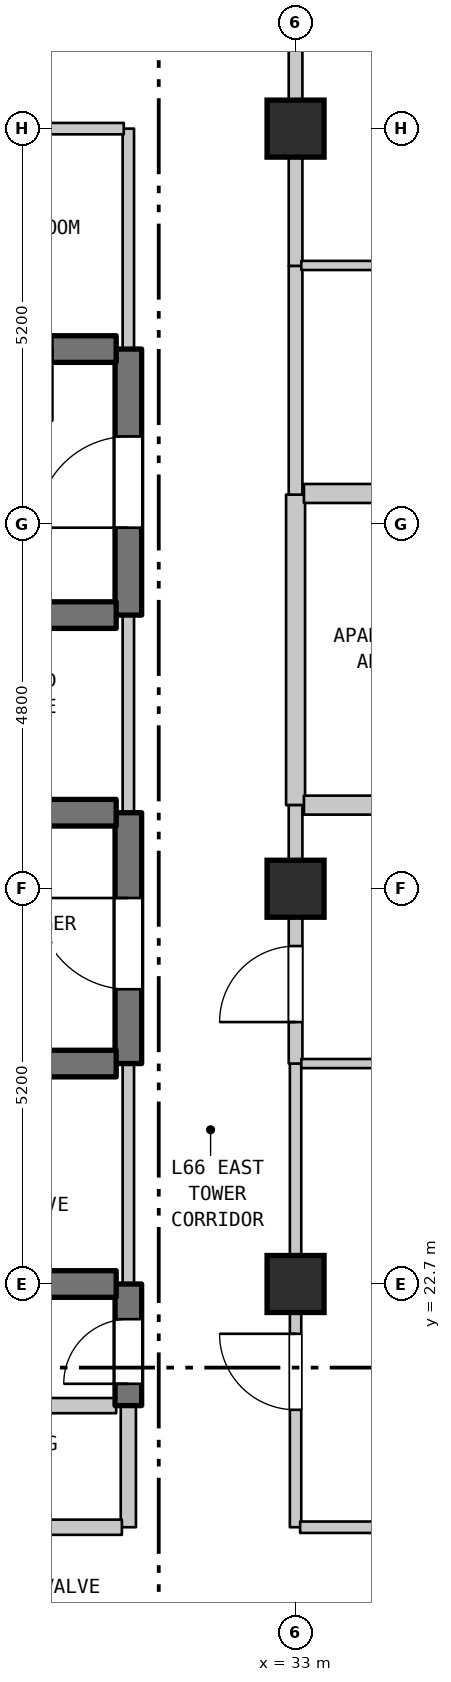
"""IFC4 building model, lengths in metres.
Left out: names, types, materials, properties, quantities, classifications, styles, units other than length and angle.
Written with IfcOpenShell. Run it as: python <this file> out.ifc"""

import sys

from ifc_helpers import new_model, si_unit, direction, frame, frame_2d, origin, origin_2d, place, context, subcontext, project, spatial, rectangle, extrude, element, fill, save


model = new_model("IFC4")
c1 = context("Model", 3, precision=1e-05, world=origin(), true_north=direction((0.0, 1.0)))
c2 = subcontext(c1, "Body", "Model", "MODEL_VIEW")
j1 = project(units=[si_unit("LENGTHUNIT", "METRE"), si_unit("PLANEANGLEUNIT", "RADIAN")], contexts=[c1])
p1 = place(None, origin())
s1 = spatial("IfcSite", under=j1, at=p1, CompositionType="ELEMENT")
p2 = place(p1, origin())
s2 = spatial("IfcBuilding", under=s1, at=p2, CompositionType="ELEMENT")
p3 = place(p2, frame((0.0, 0.0, 265.8)))
s3 = spatial("IfcBuildingStorey", under=s2, at=p3, CompositionType="ELEMENT", Elevation=265.8)
for number, where, z_axis, x_axis in (
    (1, (33.0, 22.7, 0.0), (0.0, 0.0, 1.0), (1.0, 0.0, 0.0)),
    (2, (33.0, 27.9, 0.0), (0.0, 0.0, 1.0), (1.0, 0.0, 0.0)),
    (3, (33.0, 37.9, 0.0), (0.0, 0.0, 1.0), (1.0, 0.0, 0.0)),
):
    element("IfcColumn", number, at=place(p3, frame(where, z_axis=z_axis, x_axis=x_axis)), inside=s3, PredefinedType="COLUMN", context=c2, shape_type="SweptSolid", body=[
        extrude(rectangle(XDim=0.75, YDim=0.75, at=origin_2d()), origin(), (0.0, 0.0, 1.0), 3.7),
    ])
p4 = place(p3, frame((30.8, 19.5, 0.0), z_axis=(0.0, 0.0, 1.0), x_axis=(0.0, 1.0, 0.0)))
e4 = element("IfcWall", 4, at=p4, inside=s3, PredefinedType="STANDARD", context=c2, shape_type="SweptSolid", body=[
    extrude(rectangle(XDim=1.6, YDim=0.2, at=frame_2d((0.8, 0.0))), origin(), (0.0, 0.0, 1.0), 3.39),
])
p5 = place(p3, frame((30.8, 21.1, 0.0), z_axis=(0.0, 0.0, 1.0), x_axis=(0.0, 1.0, 0.0)))
e5 = element("IfcWall", 5, at=p5, inside=s3, PredefinedType="SHEAR", context=c2, shape_type="SweptSolid", body=[
    extrude(rectangle(XDim=1.6, YDim=0.35, at=frame_2d((0.8, 0.0))), origin(), (0.0, 0.0, 1.0), 3.39),
])
p6 = place(p5, frame((0.287, 0.0, 0.0)))
e6 = element("IfcOpeningElement", 6, at=p6, cuts=e5, PredefinedType="OPENING", context=c2, shape_type="SweptSolid", body=[
    extrude(rectangle(XDim=0.85, YDim=2.1, at=frame_2d((0.425, 1.05))), frame((0.0, 0.185, 0.0), z_axis=(0.0, -1.0, 0.0), x_axis=(1.0, 0.0, 0.0)), (0.0, 0.0, 1.0), 0.37),
])
p7 = place(p3, frame((30.8, 22.7, 0.0), z_axis=(0.0, 0.0, 1.0), x_axis=(0.0, 1.0, 0.0)))
e7 = element("IfcWall", 7, at=p7, inside=s3, PredefinedType="STANDARD", context=c2, shape_type="SweptSolid", body=[
    extrude(rectangle(XDim=2.9, YDim=0.15, at=frame_2d((1.45, 0.0))), origin(), (0.0, 0.0, 1.0), 3.39),
])
p8 = place(p3, frame((30.8, 25.6, 0.0), z_axis=(0.0, 0.0, 1.0), x_axis=(0.0, 1.0, 0.0)))
e8 = element("IfcWall", 8, at=p8, inside=s3, PredefinedType="SHEAR", context=c2, shape_type="SweptSolid", body=[
    extrude(rectangle(XDim=3.3, YDim=0.35, at=frame_2d((1.65, 0.0))), origin(), (0.0, 0.0, 1.0), 3.39),
])
p9 = place(p8, frame((0.978, 0.0, 0.0)))
e9 = element("IfcOpeningElement", 9, at=p9, cuts=e8, PredefinedType="OPENING", context=c2, shape_type="SweptSolid", body=[
    extrude(rectangle(XDim=1.2, YDim=2.2, at=frame_2d((0.6, 1.1))), frame((0.0, 0.185, 0.0), z_axis=(0.0, -1.0, 0.0), x_axis=(1.0, 0.0, 0.0)), (0.0, 0.0, 1.0), 0.37),
])
p10 = place(p3, frame((30.8, 28.9, 0.0), z_axis=(0.0, 0.0, 1.0), x_axis=(0.0, 1.0, 0.0)))
e10 = element("IfcWall", 10, at=p10, inside=s3, PredefinedType="STANDARD", context=c2, shape_type="SweptSolid", body=[
    extrude(rectangle(XDim=2.6, YDim=0.15, at=frame_2d((1.3, 0.0))), origin(), (0.0, 0.0, 1.0), 3.39),
])
p11 = place(p3, frame((30.8, 31.5, 0.0), z_axis=(0.0, 0.0, 1.0), x_axis=(0.0, 1.0, 0.0)))
e11 = element("IfcWall", 11, at=p11, inside=s3, PredefinedType="SHEAR", context=c2, shape_type="SweptSolid", body=[
    extrude(rectangle(XDim=3.5, YDim=0.35, at=frame_2d((1.75, 0.0))), origin(), (0.0, 0.0, 1.0), 3.39),
])
p12 = place(p11, frame((1.15, 0.0, 0.0)))
e12 = element("IfcOpeningElement", 12, at=p12, cuts=e11, PredefinedType="OPENING", context=c2, shape_type="SweptSolid", body=[
    extrude(rectangle(XDim=1.2, YDim=2.2, at=frame_2d((0.6, 1.1))), frame((0.0, 0.185, 0.0), z_axis=(0.0, -1.0, 0.0), x_axis=(1.0, 0.0, 0.0)), (0.0, 0.0, 1.0), 0.37),
])
p13 = place(p3, frame((30.8, 35.0, 0.0), z_axis=(0.0, 0.0, 1.0), x_axis=(0.0, 1.0, 0.0)))
e13 = element("IfcWall", 13, at=p13, inside=s3, PredefinedType="STANDARD", context=c2, shape_type="SweptSolid", body=[
    extrude(rectangle(XDim=2.9, YDim=0.15, at=frame_2d((1.45, 0.0))), origin(), (0.0, 0.0, 1.0), 3.39),
])
p14 = place(p3, frame((33.0, 19.5, 0.0), z_axis=(0.0, 0.0, 1.0), x_axis=(0.0, 1.0, 0.0)))
e14 = element("IfcWall", 14, at=p14, inside=s3, PredefinedType="STANDARD", context=c2, shape_type="SweptSolid", body=[
    extrude(rectangle(XDim=6.1, YDim=0.15, at=frame_2d((3.05, 0.0))), origin(), (0.0, 0.0, 1.0), 3.1),
])
p15 = place(p14, frame((1.545, 0.0, 0.0)))
e15 = element("IfcOpeningElement", 15, at=p15, cuts=e14, PredefinedType="OPENING", context=c2, shape_type="SweptSolid", body=[
    extrude(rectangle(XDim=1.0, YDim=2.15, at=frame_2d((0.5, 1.075))), frame((0.0, 0.085, 0.0), z_axis=(0.0, -1.0, 0.0), x_axis=(1.0, 0.0, 0.0)), (0.0, 0.0, 1.0), 0.17),
])
p16 = place(p3, frame((33.0, 25.6, 0.0), z_axis=(0.0, 0.0, 1.0), x_axis=(0.0, 1.0, 0.0)))
e16 = element("IfcWall", 16, at=p16, inside=s3, PredefinedType="STANDARD", context=c2, shape_type="SweptSolid", body=[
    extrude(rectangle(XDim=2.3, YDim=0.18, at=frame_2d((1.15, 0.0))), origin(), (0.0, 0.0, 1.0), 3.1),
])
p17 = place(p16, frame((0.546, 0.0, 0.0)))
e17 = element("IfcOpeningElement", 17, at=p17, cuts=e16, PredefinedType="OPENING", context=c2, shape_type="SweptSolid", body=[
    extrude(rectangle(XDim=1.0, YDim=2.15, at=frame_2d((0.5, 1.075))), frame((0.0, 0.1, 0.0), z_axis=(0.0, -1.0, 0.0), x_axis=(1.0, 0.0, 0.0)), (0.0, 0.0, 1.0), 0.2),
])
p18 = place(p3, frame((33.0, 29.0, 0.0), z_axis=(0.0, 0.0, 1.0), x_axis=(0.0, 1.0, 0.0)))
e18 = element("IfcWall", 18, at=p18, inside=s3, PredefinedType="STANDARD", context=c2, shape_type="SweptSolid", body=[
    extrude(rectangle(XDim=4.085, YDim=0.25, at=frame_2d((2.042, 0.0))), origin(), (0.0, 0.0, 1.0), 2.89),
])
p19 = place(p3, frame((33.0, 33.085, 0.0), z_axis=(0.0, 0.0, 1.0), x_axis=(0.0, 1.0, 0.0)))
e19 = element("IfcWall", 19, at=p19, inside=s3, PredefinedType="STANDARD", context=c2, shape_type="SweptSolid", body=[
    extrude(rectangle(XDim=3.01, YDim=0.18, at=frame_2d((1.505, 0.0))), origin(), (0.0, 0.0, 1.0), 2.89),
])
p20 = place(p3, frame((33.0, 36.095, 0.0), z_axis=(0.0, 0.0, 1.0), x_axis=(0.0, 1.0, 0.0)))
e20 = element("IfcWall", 20, at=p20, inside=s3, PredefinedType="STANDARD", context=c2, shape_type="SweptSolid", body=[
    extrude(rectangle(XDim=1.805, YDim=0.18, at=frame_2d((0.902, 0.0))), origin(), (0.0, 0.0, 1.0), 2.89),
])
p21 = place(p3, frame((27.285, 19.5, 0.0), z_axis=(0.0, 0.0, 1.0), x_axis=(1.0, 0.0, 0.0)))
e21 = element("IfcWall", 21, at=p21, inside=s3, PredefinedType="STANDARD", context=c2, shape_type="SweptSolid", body=[
    extrude(rectangle(XDim=3.43, YDim=0.2, at=frame_2d((1.715, 0.0))), origin(), (0.0, 0.0, 1.0), 3.39),
])
p22 = place(p21, frame((1.192, 0.0, 0.0)))
e22 = element("IfcOpeningElement", 22, at=p22, cuts=e21, PredefinedType="OPENING", context=c2, shape_type="SweptSolid", body=[
    extrude(rectangle(XDim=0.9, YDim=2.15, at=frame_2d((0.45, 1.075))), frame((0.0, 0.11, 0.0), z_axis=(0.0, -1.0, 0.0), x_axis=(1.0, 0.0, 0.0)), (0.0, 0.0, 1.0), 0.22),
])
p23 = place(p3, frame((33.06, 19.5, 0.0), z_axis=(0.0, 0.0, 1.0), x_axis=(1.0, 0.0, 0.0)))
e23 = element("IfcWall", 23, at=p23, inside=s3, PredefinedType="STANDARD", context=c2, shape_type="SweptSolid", body=[
    extrude(rectangle(XDim=8.323, YDim=0.15, at=frame_2d((4.162, 0.0))), origin(), (0.0, 0.0, 1.0), 3.39),
])
p24 = place(p23, frame((3.583, 0.0, 0.0)))
e24 = element("IfcOpeningElement", 24, at=p24, cuts=e23, PredefinedType="OPENING", context=c2, shape_type="SweptSolid", body=[
    extrude(rectangle(XDim=1.0, YDim=2.15, at=frame_2d((0.5, 1.075))), frame((0.0, 0.085, 0.0), z_axis=(0.0, -1.0, 0.0), x_axis=(1.0, 0.0, 0.0)), (0.0, 0.0, 1.0), 0.17),
])
p25 = place(p3, frame((27.285, 21.1, 0.0), z_axis=(0.0, 0.0, 1.0), x_axis=(1.0, 0.0, 0.0)))
e25 = element("IfcWall", 25, at=p25, inside=s3, PredefinedType="STANDARD", context=c2, shape_type="SweptSolid", body=[
    extrude(rectangle(XDim=3.355, YDim=0.2, at=frame_2d((1.677, 0.0))), origin(), (0.0, 0.0, 1.0), 3.39),
])
p26 = place(p3, frame((27.46, 22.7, 0.0), z_axis=(0.0, 0.0, 1.0), x_axis=(1.0, 0.0, 0.0)))
e26 = element("IfcWall", 26, at=p26, inside=s3, PredefinedType="SHEAR", context=c2, shape_type="SweptSolid", body=[
    extrude(rectangle(XDim=3.18, YDim=0.35, at=frame_2d((1.59, 0.0))), origin(), (0.0, 0.0, 1.0), 3.39),
])
p27 = place(p3, frame((27.46, 25.6, 0.0), z_axis=(0.0, 0.0, 1.0), x_axis=(1.0, 0.0, 0.0)))
e27 = element("IfcWall", 27, at=p27, inside=s3, PredefinedType="SHEAR", context=c2, shape_type="SweptSolid", body=[
    extrude(rectangle(XDim=3.18, YDim=0.35, at=frame_2d((1.59, 0.0))), origin(), (0.0, 0.0, 1.0), 3.39),
])
p28 = place(p27, frame((1.115, 0.0, 0.0)))
e28 = element("IfcOpeningElement", 28, at=p28, cuts=e27, PredefinedType="OPENING", context=c2, shape_type="SweptSolid", body=[
    extrude(rectangle(XDim=0.95, YDim=2.15, at=frame_2d((0.475, 1.075))), frame((0.0, 0.185, 0.0), z_axis=(0.0, -1.0, 0.0), x_axis=(1.0, 0.0, 0.0)), (0.0, 0.0, 1.0), 0.37),
])
p29 = place(p3, frame((33.075, 25.6, 0.0), z_axis=(0.0, 0.0, 1.0), x_axis=(1.0, 0.0, 0.0)))
e29 = element("IfcWall", 29, at=p29, inside=s3, PredefinedType="PARTITIONING", context=c2, shape_type="SweptSolid", body=[
    extrude(rectangle(XDim=11.59, YDim=0.12, at=frame_2d((5.795, 0.0))), origin(), (0.0, 0.0, 1.0), 3.39),
])
p30 = place(p3, frame((27.46, 28.9, 0.0), z_axis=(0.0, 0.0, 1.0), x_axis=(1.0, 0.0, 0.0)))
e30 = element("IfcWall", 30, at=p30, inside=s3, PredefinedType="SHEAR", context=c2, shape_type="SweptSolid", body=[
    extrude(rectangle(XDim=3.18, YDim=0.35, at=frame_2d((1.59, 0.0))), origin(), (0.0, 0.0, 1.0), 3.39),
])
p31 = place(p30, frame((1.115, 0.0, 0.0)))
e31 = element("IfcOpeningElement", 31, at=p31, cuts=e30, PredefinedType="OPENING", context=c2, shape_type="SweptSolid", body=[
    extrude(rectangle(XDim=0.95, YDim=2.15, at=frame_2d((0.475, 1.075))), frame((0.0, 0.185, 0.0), z_axis=(0.0, -1.0, 0.0), x_axis=(1.0, 0.0, 0.0)), (0.0, 0.0, 1.0), 0.37),
])
p32 = place(p3, frame((33.11, 29.0, 0.0), z_axis=(0.0, 0.0, 1.0), x_axis=(1.0, 0.0, 0.0)))
e32 = element("IfcWall", 32, at=p32, inside=s3, PredefinedType="STANDARD", context=c2, shape_type="SweptSolid", body=[
    extrude(rectangle(XDim=4.36, YDim=0.25, at=frame_2d((2.18, 0.0))), origin(), (0.0, 0.0, 1.0), 3.39),
])
p33 = place(p3, frame((27.46, 31.5, 0.0), z_axis=(0.0, 0.0, 1.0), x_axis=(1.0, 0.0, 0.0)))
e33 = element("IfcWall", 33, at=p33, inside=s3, PredefinedType="SHEAR", context=c2, shape_type="SweptSolid", body=[
    extrude(rectangle(XDim=3.18, YDim=0.35, at=frame_2d((1.59, 0.0))), origin(), (0.0, 0.0, 1.0), 3.39),
])
p34 = place(p3, frame((33.11, 33.1, 0.0), z_axis=(0.0, 0.0, 1.0), x_axis=(1.0, 0.0, 0.0)))
e34 = element("IfcWall", 34, at=p34, inside=s3, PredefinedType="STANDARD", context=c2, shape_type="SweptSolid", body=[
    extrude(rectangle(XDim=4.36, YDim=0.25, at=frame_2d((2.18, 0.0))), origin(), (0.0, 0.0, 1.0), 3.39),
])
p35 = place(p3, frame((28.045, 35.0, 0.0), z_axis=(0.0, 0.0, 1.0), x_axis=(1.0, 0.0, 0.0)))
e35 = element("IfcWall", 35, at=p35, inside=s3, PredefinedType="SHEAR", context=c2, shape_type="SweptSolid", body=[
    extrude(rectangle(XDim=2.595, YDim=0.35, at=frame_2d((1.297, 0.0))), origin(), (0.0, 0.0, 1.0), 3.39),
])
p36 = place(p35, frame((0.806, 0.0, 0.0)))
e36 = element("IfcOpeningElement", 36, at=p36, cuts=e35, PredefinedType="OPENING", context=c2, shape_type="SweptSolid", body=[
    extrude(rectangle(XDim=0.95, YDim=2.15, at=frame_2d((0.475, 1.075))), frame((0.0, 0.185, 0.0), z_axis=(0.0, -1.0, 0.0), x_axis=(1.0, 0.0, 0.0)), (0.0, 0.0, 1.0), 0.37),
])
p37 = place(p3, frame((33.075, 36.1, 0.0), z_axis=(0.0, 0.0, 1.0), x_axis=(1.0, 0.0, 0.0)))
e37 = element("IfcWall", 37, at=p37, inside=s3, PredefinedType="PARTITIONING", context=c2, shape_type="SweptSolid", body=[
    extrude(rectangle(XDim=4.46, YDim=0.12, at=frame_2d((2.23, 0.0))), origin(), (0.0, 0.0, 1.0), 3.39),
])
p38 = place(p3, frame((28.045, 37.9, 0.0), z_axis=(0.0, 0.0, 1.0), x_axis=(1.0, 0.0, 0.0)))
e38 = element("IfcWall", 38, at=p38, inside=s3, PredefinedType="STANDARD", context=c2, shape_type="SweptSolid", body=[
    extrude(rectangle(XDim=2.695, YDim=0.15, at=frame_2d((1.348, 0.0))), origin(), (0.0, 0.0, 1.0), 2.89),
])
p39 = place(p3, frame((33.0, 27.9, 0.0), z_axis=(0.0, 0.0, 1.0), x_axis=(0.0, 1.0, 0.0)))
e39 = element("IfcWall", 39, at=p39, inside=s3, PredefinedType="STANDARD", context=c2, shape_type="SweptSolid", body=[
    extrude(rectangle(XDim=1.1, YDim=0.18, at=frame_2d((0.55, 0.0))), origin(), (0.0, 0.0, 1.0), 2.89),
])
p40 = place(p3, frame((33.0, 37.9, 0.0), z_axis=(0.0, 0.0, 1.0), x_axis=(0.0, 1.0, 0.0)))
e40 = element("IfcWall", 40, at=p40, inside=s3, PredefinedType="STANDARD", context=c2, shape_type="SweptSolid", body=[
    extrude(rectangle(XDim=1.85, YDim=0.18, at=frame_2d((0.925, 0.0))), origin(), (0.0, 0.0, 1.0), 2.79),
])
p41 = place(p6, origin())
e41 = element("IfcDoor", 41, at=p41, inside=s3, OperationType="SINGLE_SWING_LEFT", PredefinedType="DOOR", context=c2, shape_type="SweptSolid", body=[
    extrude(rectangle(XDim=0.85, YDim=2.1, at=frame_2d((0.425, 1.05))), frame((0.0, 0.025, 0.0), z_axis=(0.0, -1.0, 0.0), x_axis=(1.0, 0.0, 0.0)), (0.0, 0.0, 1.0), 0.05),
])
fill(e6, e41)
p42 = place(p9, origin())
e42 = element("IfcDoor", 42, at=p42, inside=s3, OperationType="SINGLE_SWING_RIGHT", PredefinedType="DOOR", context=c2, shape_type="SweptSolid", body=[
    extrude(rectangle(XDim=1.2, YDim=2.2, at=frame_2d((0.6, 1.1))), frame((0.0, 0.025, 0.0), z_axis=(0.0, -1.0, 0.0), x_axis=(1.0, 0.0, 0.0)), (0.0, 0.0, 1.0), 0.05),
])
fill(e9, e42)
p43 = place(p12, origin())
e43 = element("IfcDoor", 43, at=p43, inside=s3, OperationType="SINGLE_SWING_LEFT", PredefinedType="DOOR", context=c2, shape_type="SweptSolid", body=[
    extrude(rectangle(XDim=1.2, YDim=2.2, at=frame_2d((0.6, 1.1))), frame((0.0, 0.025, 0.0), z_axis=(0.0, -1.0, 0.0), x_axis=(1.0, 0.0, 0.0)), (0.0, 0.0, 1.0), 0.05),
])
fill(e12, e43)
p44 = place(p15, origin())
e44 = element("IfcDoor", 44, at=p44, inside=s3, OperationType="SINGLE_SWING_RIGHT", PredefinedType="DOOR", context=c2, shape_type="SweptSolid", body=[
    extrude(rectangle(XDim=1.0, YDim=2.15, at=frame_2d((0.5, 1.075))), frame((0.0, 0.025, 0.0), z_axis=(0.0, -1.0, 0.0), x_axis=(1.0, 0.0, 0.0)), (0.0, 0.0, 1.0), 0.05),
])
fill(e15, e44)
p45 = place(p17, origin())
e45 = element("IfcDoor", 45, at=p45, inside=s3, OperationType="SINGLE_SWING_LEFT", PredefinedType="DOOR", context=c2, shape_type="SweptSolid", body=[
    extrude(rectangle(XDim=1.0, YDim=2.15, at=frame_2d((0.5, 1.075))), frame((0.0, 0.025, 0.0), z_axis=(0.0, -1.0, 0.0), x_axis=(1.0, 0.0, 0.0)), (0.0, 0.0, 1.0), 0.05),
])
fill(e17, e45)
p46 = place(p36, frame((0.95, 0.0, 0.0), z_axis=(0.0, 0.0, 1.0), x_axis=(-1.0, 0.0, 0.0)))
e46 = element("IfcDoor", 46, at=p46, inside=s3, OperationType="SINGLE_SWING_RIGHT", PredefinedType="DOOR", context=c2, shape_type="SweptSolid", body=[
    extrude(rectangle(XDim=0.95, YDim=2.15, at=frame_2d((0.475, 1.075))), frame((0.0, 0.025, 0.0), z_axis=(0.0, -1.0, 0.0), x_axis=(1.0, 0.0, 0.0)), (0.0, 0.0, 1.0), 0.05),
])
fill(e36, e46)
save(model, sys.argv[1])
